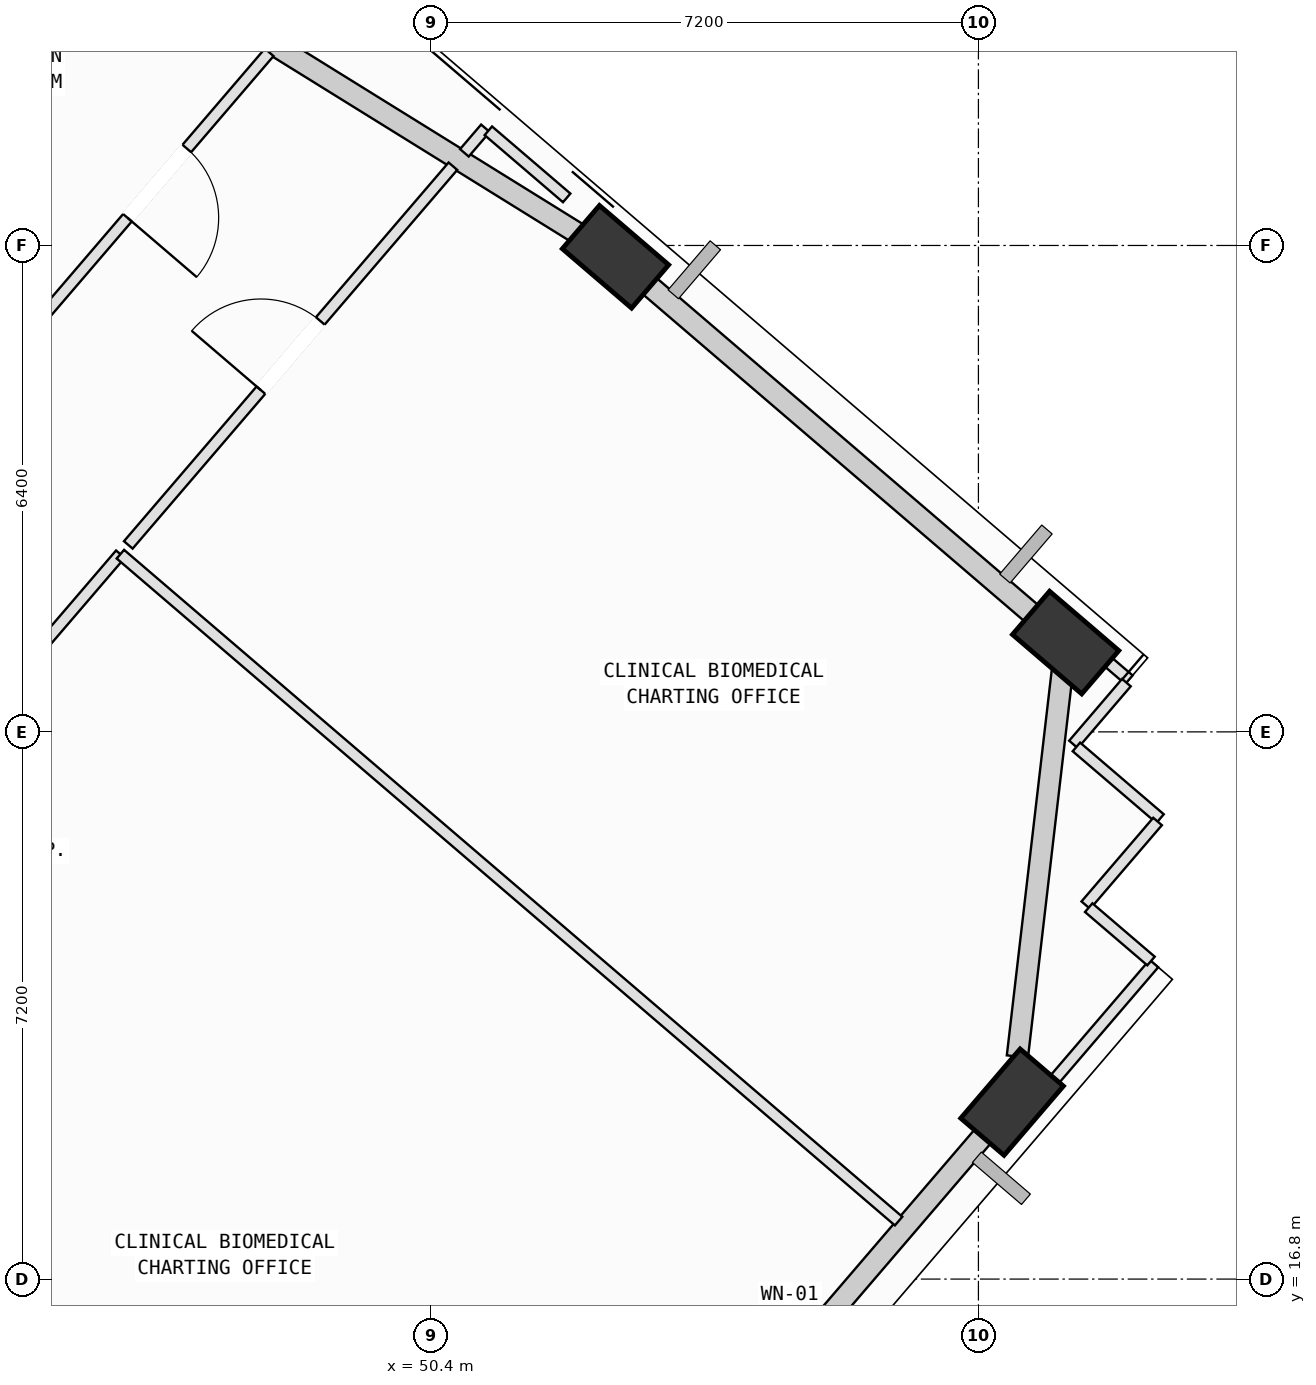
"""IFC4 building model, lengths in metres.
Left out: names, types, materials, properties, quantities, classifications, styles, units other than length and angle.
Written with IfcOpenShell. Run it as: python <this file> out.ifc"""

import sys

from ifc_helpers import new_model, si_unit, direction, frame, frame_2d, origin, origin_2d, place, context, subcontext, project, spatial, rectangle, extrude, element, fill, save


model = new_model("IFC4")
c1 = context("Model", 3, precision=1e-05, world=origin(), true_north=direction((0.0, 1.0)))
c2 = subcontext(c1, "Body", "Model", "MODEL_VIEW")
j1 = project(units=[si_unit("LENGTHUNIT", "METRE"), si_unit("PLANEANGLEUNIT", "RADIAN")], contexts=[c1])
p1 = place(None, origin())
s1 = spatial("IfcSite", under=j1, at=p1, CompositionType="ELEMENT")
p2 = place(p1, origin())
s2 = spatial("IfcBuilding", under=s1, at=p2, CompositionType="ELEMENT")
p3 = place(p2, frame((0.0, 0.0, 235.2)))
s3 = spatial("IfcBuildingStorey", under=s2, at=p3, CompositionType="ELEMENT", Elevation=235.2)
p4 = place(p3, frame((58.043, 19.128, 0.002), z_axis=(0.022543132475, 0.100988372435, 0.994632171112), x_axis=(-0.799671411694, -0.595275745742, 0.078564749414)))
e1 = element("IfcColumn", 1, at=p4, inside=s3, PredefinedType="COLUMN", context=c2, shape_type="SweptSolid", body=[
    extrude(rectangle(XDim=1.2, YDim=0.75, at=origin_2d()), origin(), (0.0, 0.0, 1.0), 4.018),
])
p5 = place(p3, frame((58.748, 25.175, 0.002), z_axis=(-0.002369710442, 0.103659641367, 0.994610005592), x_axis=(0.773865953742, -0.629744700477, 0.067476646784)))
e2 = element("IfcColumn", 2, at=p5, inside=s3, PredefinedType="COLUMN", context=c2, shape_type="SweptSolid", body=[
    extrude(rectangle(XDim=1.2, YDim=0.75, at=origin_2d()), origin(), (0.0, 0.0, 1.0), 4.018),
])
p6 = place(p3, frame((52.825, 30.251, 0.002), z_axis=(-0.023135441206, 0.07920844476, 0.996589571308), x_axis=(0.910653039281, -0.409667287517, 0.053700610666)))
e3 = element("IfcColumn", 3, at=p6, inside=s3, PredefinedType="COLUMN", context=c2, shape_type="SweptSolid", body=[
    extrude(rectangle(XDim=1.2, YDim=0.75, at=origin_2d()), origin(), (0.0, 0.0, 1.0), 4.01),
])
p7 = place(p3, frame((57.912, 18.975, 0.0), z_axis=(0.0, 0.0, 1.0), x_axis=(-0.650781975929, -0.759264657287, 0.0)))
e4 = element("IfcWall", 4, at=p7, inside=s3, PredefinedType="SOLIDWALL", context=c2, shape_type="SweptSolid", body=[
    extrude(rectangle(XDim=6.418, YDim=0.28, at=frame_2d((3.209, 0.0))), origin(), (0.0, 0.0, 1.0), 3.265),
])
p8 = place(p7, frame((3.493, 0.0, 0.75)))
e5 = element("IfcOpeningElement", 5, at=p8, cuts=e4, PredefinedType="OPENING", context=c2, shape_type="SweptSolid", body=[
    extrude(rectangle(XDim=1.6, YDim=1.95, at=frame_2d((0.8, 0.975))), frame((0.0, 0.15, 0.0), z_axis=(0.0, -1.0, 0.0), x_axis=(1.0, 0.0, 0.0)), (0.0, 0.0, 1.0), 0.3),
])
p9 = place(p3, frame((58.726, 24.986, 0.0), z_axis=(0.0, 0.0, 1.0), x_axis=(-0.115749518147, -0.993278434805, 0.0)))
e6 = element("IfcWall", 6, at=p9, inside=s3, PredefinedType="SOLIDWALL", context=c2, shape_type="SweptSolid", body=[
    extrude(rectangle(XDim=5.294, YDim=0.28, at=frame_2d((2.647, 0.0))), origin(), (0.0, 0.0, 1.0), 3.265),
])
p10 = place(p3, frame((53.014, 30.089, 0.0), z_axis=(0.0, 0.0, 1.0), x_axis=(0.759281059395, -0.650762839169, 0.0)))
e7 = element("IfcWall", 7, at=p10, inside=s3, PredefinedType="SOLIDWALL", context=c2, shape_type="SweptSolid", body=[
    extrude(rectangle(XDim=7.046, YDim=0.28, at=frame_2d((3.523, 0.0))), origin(), (0.0, 0.0, 1.0), 3.265),
])
p11 = place(p3, frame((44.717, 35.28, 0.0), z_axis=(0.0, 0.0, 1.0), x_axis=(0.849811688813, -0.527086419439, 0.0)))
e8 = element("IfcWall", 8, at=p11, inside=s3, PredefinedType="SOLIDWALL", context=c2, shape_type="SweptSolid", body=[
    extrude(rectangle(XDim=9.036, YDim=0.28, at=frame_2d((4.518, 0.0))), origin(), (0.0, 0.0, 1.0), 3.265),
])
p12 = place(p3, frame((41.23, 20.41, 0.0), z_axis=(0.0, 0.0, 1.0), x_axis=(0.650786223128, 0.759261016902, 0.0)))
e9 = element("IfcWall", 9, at=p12, inside=s3, PredefinedType="PARTITIONING", context=c2, shape_type="SweptSolid", body=[
    extrude(rectangle(XDim=7.808, YDim=0.15, at=frame_2d((3.904, 0.0))), origin(), (0.0, 0.0, 1.0), 3.78),
])
p13 = place(p12, frame((3.304, 0.0, 0.0)))
e10 = element("IfcOpeningElement", 10, at=p13, cuts=e9, PredefinedType="OPENING", context=c2, shape_type="SweptSolid", body=[
    extrude(rectangle(XDim=1.2, YDim=2.15, at=frame_2d((0.6, 1.075))), frame((0.0, 0.085, 0.0), z_axis=(0.0, -1.0, 0.0), x_axis=(1.0, 0.0, 0.0)), (0.0, 0.0, 1.0), 0.17),
])
p14 = place(p3, frame((46.311, 26.338, 0.0), z_axis=(0.0, 0.0, 1.0), x_axis=(0.759307720166, -0.650731731281, 0.0)))
e11 = element("IfcWall", 11, at=p14, inside=s3, PredefinedType="PARTITIONING", context=c2, shape_type="SweptSolid", body=[
    extrude(rectangle(XDim=13.485, YDim=0.15, at=frame_2d((6.742, 0.0))), origin(), (0.0, 0.0, 1.0), 3.78),
])
p15 = place(p3, frame((59.909, 20.952, 0.0), z_axis=(0.0, 0.0, 1.0), x_axis=(-0.65076984133, -0.759275057944, 0.0)))
e12 = element("IfcWall", 12, at=p15, inside=s3, PredefinedType="PARTITIONING", context=c2, shape_type="SweptSolid", body=[
    extrude(rectangle(XDim=2.801, YDim=0.15, at=frame_2d((1.401, 0.0))), origin(), (0.0, 0.0, 1.0), 3.265),
])
p16 = place(p3, frame((46.415, 26.46, 0.0), z_axis=(0.0, 0.0, 1.0), x_axis=(0.650766865256, 0.759277608708, 0.0)))
e13 = element("IfcWall", 13, at=p16, inside=s3, PredefinedType="PARTITIONING", context=c2, shape_type="SweptSolid", body=[
    extrude(rectangle(XDim=6.563, YDim=0.15, at=frame_2d((3.281, 0.0))), origin(), (0.0, 0.0, 1.0), 3.78),
])
p17 = place(p16, frame((2.681, 0.0, 0.0)))
e14 = element("IfcOpeningElement", 14, at=p17, cuts=e13, PredefinedType="OPENING", context=c2, shape_type="SweptSolid", body=[
    extrude(rectangle(XDim=1.2, YDim=2.15, at=frame_2d((0.6, 1.075))), frame((0.0, 0.085, 0.0), z_axis=(0.0, -1.0, 0.0), x_axis=(1.0, 0.0, 0.0)), (0.0, 0.0, 1.0), 0.17),
])
p18 = place(p3, frame((50.837, 31.619, 0.0), z_axis=(0.0, 0.0, 1.0), x_axis=(0.651122018941, 0.758973067012, 0.0)))
e15 = element("IfcWall", 15, at=p18, inside=s3, PredefinedType="PARTITIONING", context=c2, shape_type="SweptSolid", body=[
    extrude(rectangle(XDim=0.426, YDim=0.15, at=frame_2d((0.213, 0.0))), origin(), (0.0, 0.0, 1.0), 3.78),
])
p19 = place(p3, frame((51.152, 31.909, 0.0), z_axis=(0.0, 0.0, 1.0), x_axis=(0.759497758011, -0.65050991966, 0.0)))
e16 = element("IfcWall", 16, at=p19, inside=s3, PredefinedType="PARTITIONING", context=c2, shape_type="SweptSolid", body=[
    extrude(rectangle(XDim=1.357, YDim=0.15, at=frame_2d((0.679, 0.0))), origin(), (0.0, 0.0, 1.0), 3.265),
])
p20 = place(p3, frame((52.528, 30.73, 0.0), z_axis=(0.0, 0.0, 1.0), x_axis=(0.759673156641, -0.650305078466, 0.0)))
e17 = element("IfcWall", 17, at=p20, inside=s3, PredefinedType="PARTITIONING", context=c2, shape_type="SweptSolid", body=[
    extrude(rectangle(XDim=0.786, YDim=0.15, at=frame_2d((0.393, 0.0))), origin(), (0.0, 0.0, 1.0), 3.265),
])
p21 = place(p3, frame((58.475, 25.633, 0.0), z_axis=(0.0, 0.0, 1.0), x_axis=(0.759292127366, -0.650749925332, 0.0)))
e18 = element("IfcWall", 18, at=p21, inside=s3, PredefinedType="PARTITIONING", context=c2, shape_type="SweptSolid", body=[
    extrude(rectangle(XDim=1.455, YDim=0.15, at=frame_2d((0.728, 0.0))), origin(), (0.0, 0.0, 1.0), 3.265),
])
p22 = place(p3, frame((59.547, 24.648, 0.0), z_axis=(0.0, 0.0, 1.0), x_axis=(-0.65035918922, -0.759626832726, 0.0)))
e19 = element("IfcWall", 19, at=p22, inside=s3, PredefinedType="PARTITIONING", context=c2, shape_type="SweptSolid", body=[
    extrude(rectangle(XDim=1.07, YDim=0.15, at=frame_2d((0.535, 0.0))), origin(), (0.0, 0.0, 1.0), 3.78),
])
p23 = place(p3, frame((58.889, 23.802, 0.0), z_axis=(0.0, 0.0, 1.0), x_axis=(0.759482410288, -0.650527838346, 0.0)))
e20 = element("IfcWall", 20, at=p23, inside=s3, PredefinedType="PARTITIONING", context=c2, shape_type="SweptSolid", body=[
    extrude(rectangle(XDim=1.45, YDim=0.15, at=frame_2d((0.725, 0.0))), origin(), (0.0, 0.0, 1.0), 3.78),
])
p24 = place(p3, frame((59.957, 22.821, 0.0), z_axis=(0.0, 0.0, 1.0), x_axis=(-0.650916123841, -0.759149655683, 0.0)))
e21 = element("IfcWall", 21, at=p24, inside=s3, PredefinedType="PARTITIONING", context=c2, shape_type="SweptSolid", body=[
    extrude(rectangle(XDim=1.45, YDim=0.15, at=frame_2d((0.725, 0.0))), origin(), (0.0, 0.0, 1.0), 3.78),
])
p25 = place(p3, frame((59.051, 21.687, 0.0), z_axis=(0.0, 0.0, 1.0), x_axis=(0.759719402276, -0.650251051368, 0.0)))
e22 = element("IfcWall", 22, at=p25, inside=s3, PredefinedType="PARTITIONING", context=c2, shape_type="SweptSolid", body=[
    extrude(rectangle(XDim=1.079, YDim=0.15, at=frame_2d((0.54, 0.0))), origin(), (0.0, 0.0, 1.0), 3.78),
])
p26 = place(p3, frame((48.269, 32.941, 0.0), z_axis=(0.0, 0.0, 1.0), x_axis=(-0.650742568716, -0.759298432278, 0.0)))
e23 = element("IfcWall", 23, at=p26, inside=s3, PredefinedType="PARTITIONING", context=c2, shape_type="SweptSolid", body=[
    extrude(rectangle(XDim=4.532, YDim=0.15, at=frame_2d((2.266, 0.0))), origin(), (0.0, 0.0, 1.0), 3.78),
])
p27 = place(p26, frame((1.666, 0.0, 0.0)))
e24 = element("IfcOpeningElement", 24, at=p27, cuts=e23, PredefinedType="OPENING", context=c2, shape_type="SweptSolid", body=[
    extrude(rectangle(XDim=1.2, YDim=2.15, at=frame_2d((0.6, 1.075))), frame((0.0, 0.085, 0.0), z_axis=(0.0, -1.0, 0.0), x_axis=(1.0, 0.0, 0.0)), (0.0, 0.0, 1.0), 0.17),
])
p28 = place(p17, origin())
e25 = element("IfcDoor", 25, at=p28, inside=s3, OperationType="SINGLE_SWING_LEFT", PredefinedType="DOOR", context=c2, shape_type="SweptSolid", body=[
    extrude(rectangle(XDim=1.2, YDim=2.15, at=frame_2d((0.6, 1.075))), frame((0.0, 0.025, 0.0), z_axis=(0.0, -1.0, 0.0), x_axis=(1.0, 0.0, 0.0)), (0.0, 0.0, 1.0), 0.05),
])
fill(e14, e25)
p29 = place(p27, origin())
e26 = element("IfcDoor", 26, at=p29, inside=s3, OperationType="SINGLE_SWING_RIGHT", PredefinedType="DOOR", context=c2, shape_type="SweptSolid", body=[
    extrude(rectangle(XDim=1.2, YDim=2.15, at=frame_2d((0.6, 1.075))), frame((0.0, 0.025, 0.0), z_axis=(0.0, -1.0, 0.0), x_axis=(1.0, 0.0, 0.0)), (0.0, 0.0, 1.0), 0.05),
])
fill(e24, e26)
save(model, sys.argv[1])
